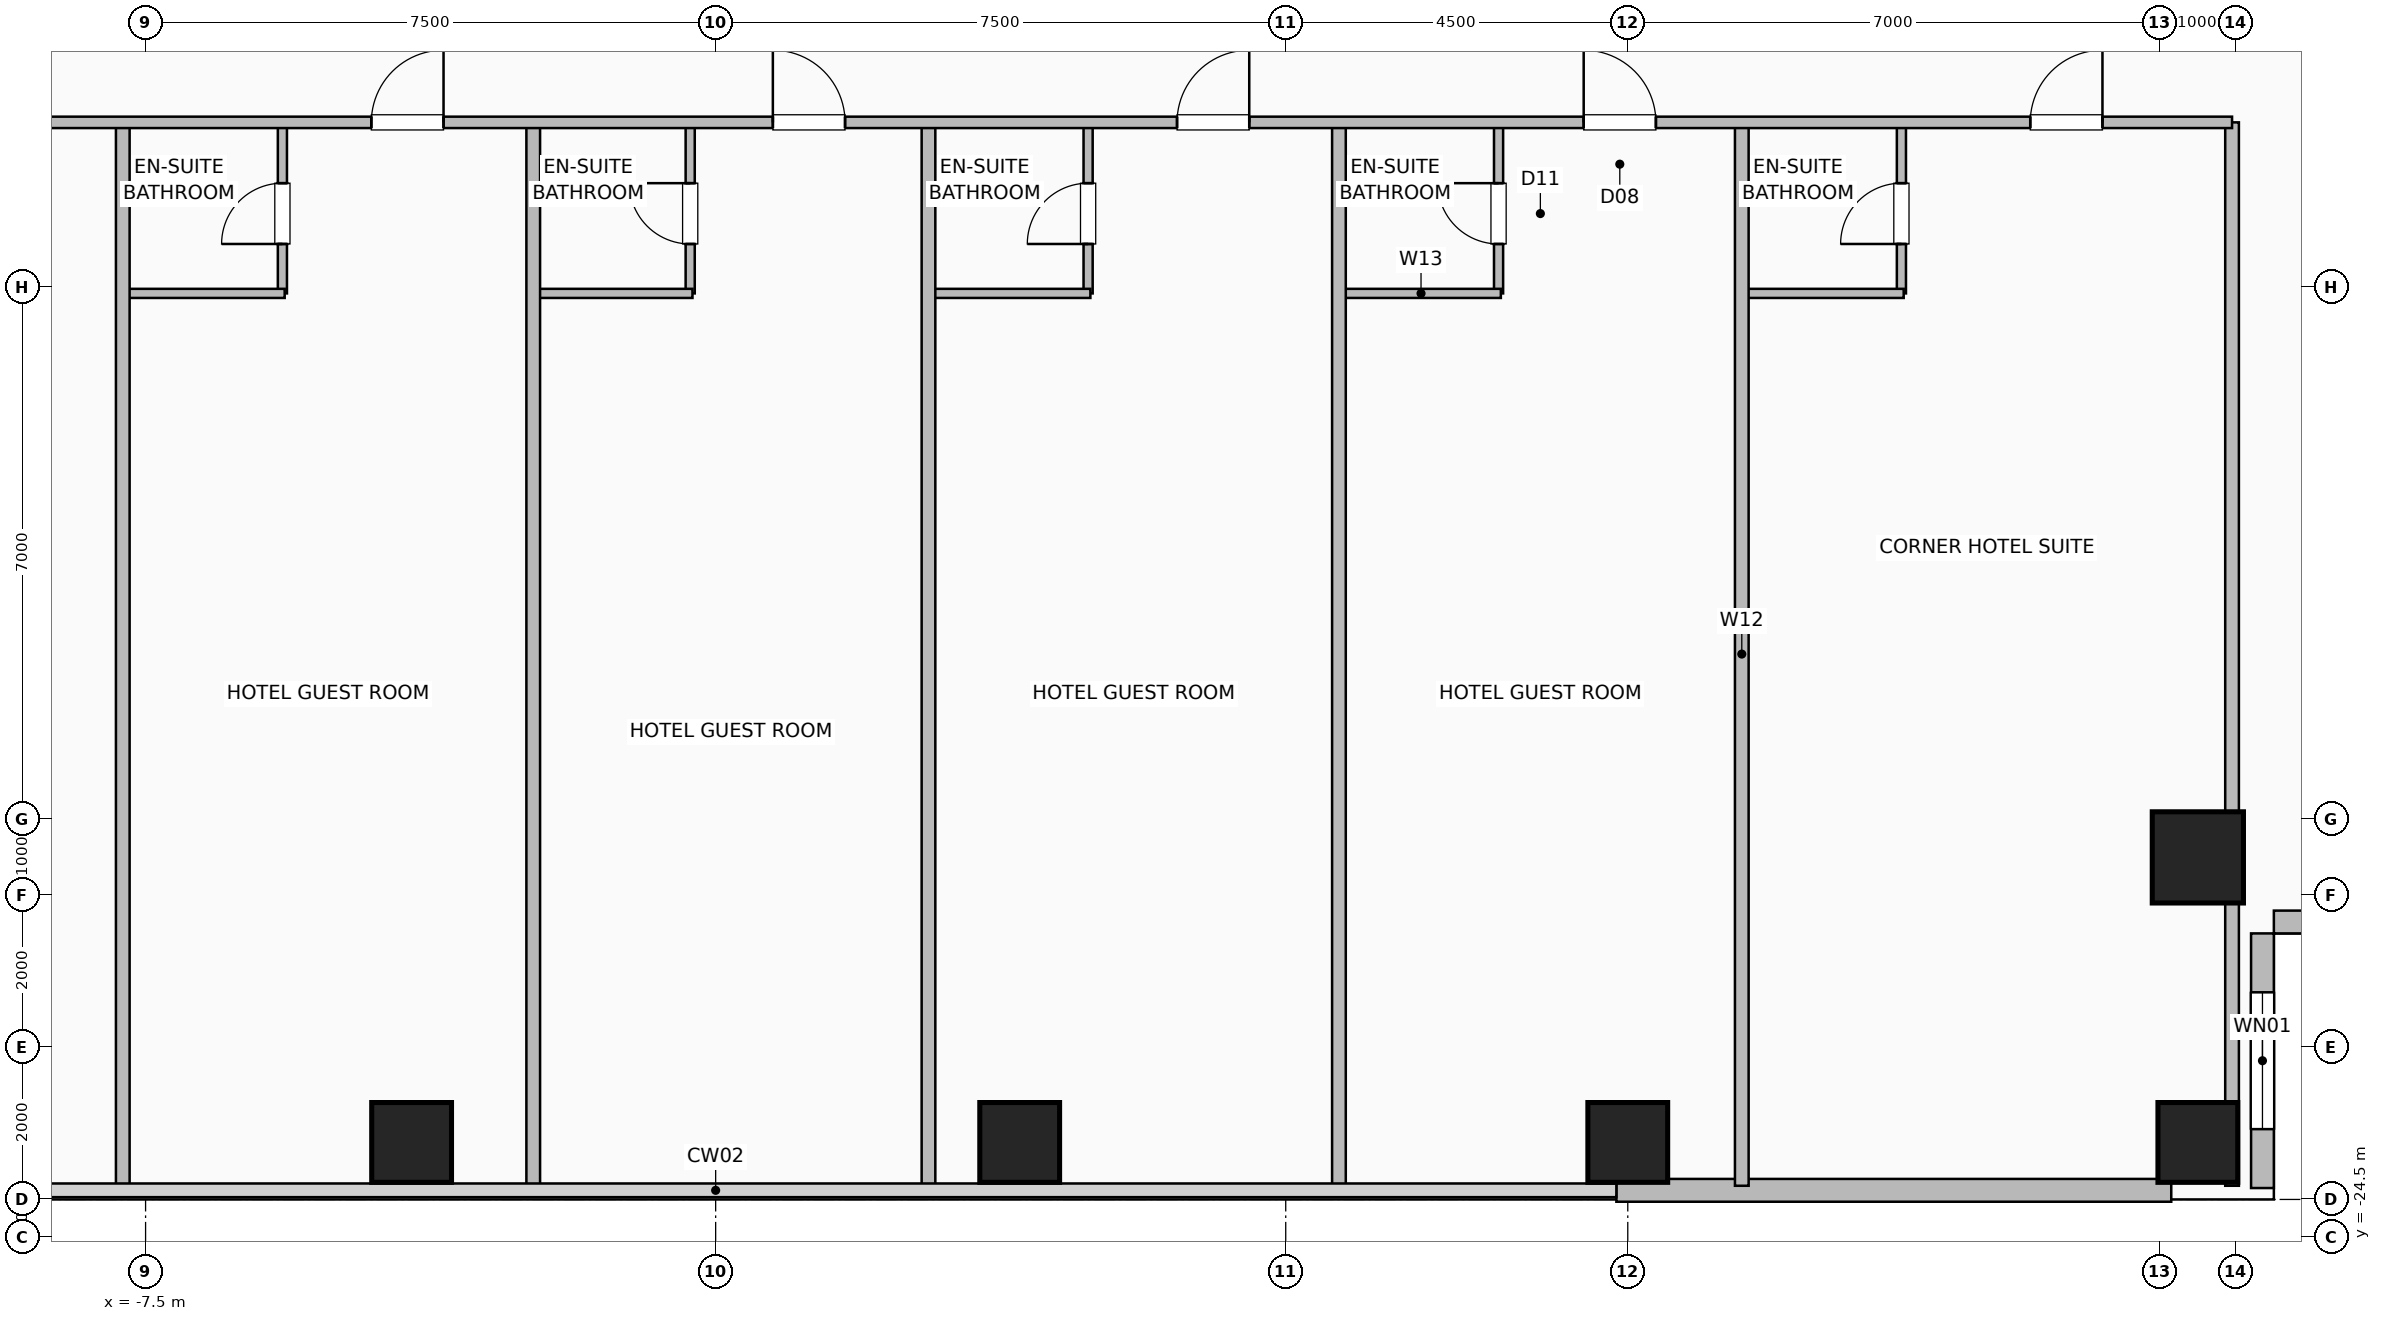
"""IFC4 building model, lengths in metres.
Left out: names, types, materials, properties, quantities, classifications, styles, units other than length and angle.
Written with IfcOpenShell. Run it as: python <this file> out.ifc"""

import sys

from ifc_helpers import new_model, si_unit, direction, frame, frame_2d, origin, origin_2d, place, context, subcontext, project, spatial, rectangle, hollow_rectangle, extrude, element, fill, save


model = new_model("IFC4")
c1 = context("Model", 3, precision=1e-05, world=origin(), true_north=direction((0.0, 1.0)))
c2 = subcontext(c1, "Body", "Model", "MODEL_VIEW")
j1 = project(units=[si_unit("LENGTHUNIT", "METRE"), si_unit("PLANEANGLEUNIT", "RADIAN")], contexts=[c1])
p1 = place(None, origin())
s1 = spatial("IfcSite", under=j1, at=p1, CompositionType="ELEMENT")
p2 = place(p1, origin())
s2 = spatial("IfcBuilding", under=s1, at=p2, CompositionType="ELEMENT")
p3 = place(p2, frame((0.0, 0.0, 34.0)))
s3 = spatial("IfcBuildingStorey", under=s2, at=p3, CompositionType="ELEMENT", Elevation=34.0)
for number, where, z_axis, x_axis in (
    (1, (-4.0, -23.25, 0.0), (0.0, 0.0, 1.0), (1.0, 0.0, 0.0)),
    (2, (4.0, -23.25, 0.0), (0.0, 0.0, 1.0), (1.0, 0.0, 0.0)),
    (3, (12.0, -23.25, 0.0), (0.0, 0.0, 1.0), (1.0, 0.0, 0.0)),
    (4, (19.5, -23.25, 0.0), (0.0, 0.0, 1.0), (1.0, 0.0, 0.0)),
):
    element("IfcColumn", number, at=place(p3, frame(where, z_axis=z_axis, x_axis=x_axis)), inside=s3, PredefinedType="COLUMN", context=c2, shape_type="SweptSolid", body=[
        extrude(hollow_rectangle(XDim=1.05, YDim=1.05, WallThickness=0.05, at=origin_2d()), origin(), (0.0, 0.0, 1.0), 3.5),
    ])
p4 = place(p3, frame((19.5, -19.5, 0.0), z_axis=(0.0, 0.0, 1.0), x_axis=(1.0, 0.0, 0.0)))
e5 = element("IfcColumn", 5, at=p4, inside=s3, PredefinedType="COLUMN", context=c2, shape_type="SweptSolid", body=[
    extrude(hollow_rectangle(XDim=1.2, YDim=1.2, WallThickness=0.055, at=origin_2d()), origin(), (0.0, 0.0, 1.0), 3.5),
])
p5 = place(p3, frame((11.85, -23.88, 0.0), z_axis=(0.0, 0.0, 1.0), x_axis=(1.0, 0.0, 0.0)))
e6 = element("IfcWall", 6, at=p5, inside=s3, PredefinedType="SOLIDWALL", context=c2, shape_type="SweptSolid", body=[
    extrude(rectangle(XDim=7.3, YDim=0.3, at=frame_2d((3.65, 0.0))), origin(), (0.0, 0.0, 1.0), 3.25),
])
p6 = place(p3, frame((20.35, -23.85, 0.0), z_axis=(0.0, 0.0, 1.0), x_axis=(0.0, 1.0, 0.0)))
e7 = element("IfcWall", 7, at=p6, inside=s3, PredefinedType="SOLIDWALL", context=c2, shape_type="SweptSolid", body=[
    extrude(rectangle(XDim=3.35, YDim=0.3, at=frame_2d((1.675, 0.0))), origin(), (0.0, 0.0, 1.0), 3.25),
])
p7 = place(p6, frame((0.775, 0.0, 0.9)))
e8 = element("IfcOpeningElement", 8, at=p7, cuts=e7, PredefinedType="OPENING", context=c2, shape_type="SweptSolid", body=[
    extrude(rectangle(XDim=1.8, YDim=1.8, at=frame_2d((0.9, 0.9))), frame((0.0, 0.16, 0.0), z_axis=(0.0, -1.0, 0.0), x_axis=(1.0, 0.0, 0.0)), (0.0, 0.0, 1.0), 0.32),
])
p8 = place(p3, frame((23.85, -20.35, 0.0), z_axis=(0.0, 0.0, 1.0), x_axis=(-1.0, 0.0, 0.0)))
e9 = element("IfcWall", 9, at=p8, inside=s3, PredefinedType="SOLIDWALL", context=c2, shape_type="SweptSolid", body=[
    extrude(rectangle(XDim=3.35, YDim=0.3, at=frame_2d((1.675, 0.0))), origin(), (0.0, 0.0, 1.0), 3.25),
])
p9 = place(p3, frame((-5.7, -12.08, 0.0), z_axis=(0.0, 0.0, 1.0), x_axis=(0.0, 1.0, 0.0)))
e10 = element("IfcWall", 10, at=p9, inside=s3, PredefinedType="PLUMBINGWALL", context=c2, shape_type="SweptSolid", body=[
    extrude(rectangle(XDim=2.25, YDim=0.12, at=frame_2d((1.125, 0.0))), origin(), (0.0, 0.0, 1.0), 3.25),
])
p10 = place(p9, frame((0.65, 0.0, 0.0)))
e11 = element("IfcOpeningElement", 11, at=p10, cuts=e10, PredefinedType="OPENING", context=c2, shape_type="SweptSolid", body=[
    extrude(rectangle(XDim=0.8, YDim=2.05, at=frame_2d((0.4, 1.025))), frame((0.0, 0.07, 0.0), z_axis=(0.0, -1.0, 0.0), x_axis=(1.0, 0.0, 0.0)), (0.0, 0.0, 1.0), 0.14),
])
p11 = place(p3, frame((-7.77, -12.08, 0.0), z_axis=(0.0, 0.0, 1.0), x_axis=(1.0, 0.0, 0.0)))
e12 = element("IfcWall", 12, at=p11, inside=s3, PredefinedType="PLUMBINGWALL", context=c2, shape_type="SweptSolid", body=[
    extrude(rectangle(XDim=2.1, YDim=0.12, at=frame_2d((1.05, 0.0))), origin(), (0.0, 0.0, 1.0), 3.25),
])
p12 = place(p3, frame((-0.335, -12.08, 0.0), z_axis=(0.0, 0.0, 1.0), x_axis=(0.0, 1.0, 0.0)))
e13 = element("IfcWall", 13, at=p12, inside=s3, PredefinedType="PLUMBINGWALL", context=c2, shape_type="SweptSolid", body=[
    extrude(rectangle(XDim=2.25, YDim=0.12, at=frame_2d((1.125, 0.0))), origin(), (0.0, 0.0, 1.0), 3.25),
])
p13 = place(p12, frame((0.65, 0.0, 0.0)))
e14 = element("IfcOpeningElement", 14, at=p13, cuts=e13, PredefinedType="OPENING", context=c2, shape_type="SweptSolid", body=[
    extrude(rectangle(XDim=0.8, YDim=2.05, at=frame_2d((0.4, 1.025))), frame((0.0, 0.07, 0.0), z_axis=(0.0, -1.0, 0.0), x_axis=(1.0, 0.0, 0.0)), (0.0, 0.0, 1.0), 0.14),
])
p14 = place(p3, frame((-2.37, -12.08, 0.0), z_axis=(0.0, 0.0, 1.0), x_axis=(1.0, 0.0, 0.0)))
e15 = element("IfcWall", 15, at=p14, inside=s3, PredefinedType="PLUMBINGWALL", context=c2, shape_type="SweptSolid", body=[
    extrude(rectangle(XDim=2.065, YDim=0.12, at=frame_2d((1.033, 0.0))), origin(), (0.0, 0.0, 1.0), 3.25),
])
p15 = place(p3, frame((4.9, -12.08, 0.0), z_axis=(0.0, 0.0, 1.0), x_axis=(0.0, 1.0, 0.0)))
e16 = element("IfcWall", 16, at=p15, inside=s3, PredefinedType="PLUMBINGWALL", context=c2, shape_type="SweptSolid", body=[
    extrude(rectangle(XDim=2.25, YDim=0.12, at=frame_2d((1.125, 0.0))), origin(), (0.0, 0.0, 1.0), 3.25),
])
p16 = place(p15, frame((0.65, 0.0, 0.0)))
e17 = element("IfcOpeningElement", 17, at=p16, cuts=e16, PredefinedType="OPENING", context=c2, shape_type="SweptSolid", body=[
    extrude(rectangle(XDim=0.8, YDim=2.05, at=frame_2d((0.4, 1.025))), frame((0.0, 0.07, 0.0), z_axis=(0.0, -1.0, 0.0), x_axis=(1.0, 0.0, 0.0)), (0.0, 0.0, 1.0), 0.14),
])
p17 = place(p3, frame((2.83, -12.08, 0.0), z_axis=(0.0, 0.0, 1.0), x_axis=(1.0, 0.0, 0.0)))
e18 = element("IfcWall", 18, at=p17, inside=s3, PredefinedType="PLUMBINGWALL", context=c2, shape_type="SweptSolid", body=[
    extrude(rectangle(XDim=2.1, YDim=0.12, at=frame_2d((1.05, 0.0))), origin(), (0.0, 0.0, 1.0), 3.25),
])
p18 = place(p3, frame((10.3, -12.08, 0.0), z_axis=(0.0, 0.0, 1.0), x_axis=(0.0, 1.0, 0.0)))
e19 = element("IfcWall", 19, at=p18, inside=s3, PredefinedType="PLUMBINGWALL", context=c2, shape_type="SweptSolid", body=[
    extrude(rectangle(XDim=2.25, YDim=0.12, at=frame_2d((1.125, 0.0))), origin(), (0.0, 0.0, 1.0), 3.25),
])
p19 = place(p18, frame((0.65, 0.0, 0.0)))
e20 = element("IfcOpeningElement", 20, at=p19, cuts=e19, PredefinedType="OPENING", context=c2, shape_type="SweptSolid", body=[
    extrude(rectangle(XDim=0.8, YDim=2.05, at=frame_2d((0.4, 1.025))), frame((0.0, 0.07, 0.0), z_axis=(0.0, -1.0, 0.0), x_axis=(1.0, 0.0, 0.0)), (0.0, 0.0, 1.0), 0.14),
])
p20 = place(p3, frame((8.23, -12.08, 0.0), z_axis=(0.0, 0.0, 1.0), x_axis=(1.0, 0.0, 0.0)))
e21 = element("IfcWall", 21, at=p20, inside=s3, PredefinedType="PLUMBINGWALL", context=c2, shape_type="SweptSolid", body=[
    extrude(rectangle(XDim=2.1, YDim=0.12, at=frame_2d((1.05, 0.0))), origin(), (0.0, 0.0, 1.0), 3.25),
])
p21 = place(p3, frame((15.6, -12.08, 0.0), z_axis=(0.0, 0.0, 1.0), x_axis=(0.0, 1.0, 0.0)))
e22 = element("IfcWall", 22, at=p21, inside=s3, PredefinedType="PLUMBINGWALL", context=c2, shape_type="SweptSolid", body=[
    extrude(rectangle(XDim=2.25, YDim=0.12, at=frame_2d((1.125, 0.0))), origin(), (0.0, 0.0, 1.0), 3.25),
])
p22 = place(p21, frame((0.65, 0.0, 0.0)))
e23 = element("IfcOpeningElement", 23, at=p22, cuts=e22, PredefinedType="OPENING", context=c2, shape_type="SweptSolid", body=[
    extrude(rectangle(XDim=0.8, YDim=2.05, at=frame_2d((0.4, 1.025))), frame((0.0, 0.07, 0.0), z_axis=(0.0, -1.0, 0.0), x_axis=(1.0, 0.0, 0.0)), (0.0, 0.0, 1.0), 0.14),
])
p23 = place(p3, frame((13.53, -12.08, 0.0), z_axis=(0.0, 0.0, 1.0), x_axis=(1.0, 0.0, 0.0)))
e24 = element("IfcWall", 24, at=p23, inside=s3, PredefinedType="PLUMBINGWALL", context=c2, shape_type="SweptSolid", body=[
    extrude(rectangle(XDim=2.1, YDim=0.12, at=frame_2d((1.05, 0.0))), origin(), (0.0, 0.0, 1.0), 3.25),
])
for number, where, z_axis, x_axis in (
    (25, (-7.8, -23.82, 0.0), (0.0, 0.0, 1.0), (0.0, 1.0, 0.0)),
    (26, (-2.4, -23.82, 0.0), (0.0, 0.0, 1.0), (0.0, 1.0, 0.0)),
    (27, (2.8, -23.82, 0.0), (0.0, 0.0, 1.0), (0.0, 1.0, 0.0)),
    (28, (8.2, -23.82, 0.0), (0.0, 0.0, 1.0), (0.0, 1.0, 0.0)),
    (29, (13.5, -23.82, 0.0), (0.0, 0.0, 1.0), (0.0, 1.0, 0.0)),
    (30, (19.95, -23.82, 0.0), (0.0, 0.0, 1.0), (0.0, 1.0, 0.0)),
):
    element("IfcWall", number, at=place(p3, frame(where, z_axis=z_axis, x_axis=x_axis)), inside=s3, PredefinedType="PARTITIONING", context=c2, shape_type="SweptSolid", body=[
        extrude(rectangle(XDim=13.99, YDim=0.18, at=frame_2d((6.995, 0.0))), origin(), (0.0, 0.0, 1.0), 3.25),
    ])
p24 = place(p3, frame((-19.95, -9.83, 0.0), z_axis=(0.0, 0.0, 1.0), x_axis=(1.0, 0.0, 0.0)))
e31 = element("IfcWall", 31, at=p24, inside=s3, PredefinedType="PARTITIONING", context=c2, shape_type="SweptSolid", body=[
    extrude(rectangle(XDim=39.9, YDim=0.15, at=frame_2d((19.95, 0.0))), origin(), (0.0, 0.0, 1.0), 3.25),
])
p25 = place(p24, frame((3.945, 0.0, 0.0)))
e32 = element("IfcOpeningElement", 32, at=p25, cuts=e31, PredefinedType="OPENING", context=c2, shape_type="SweptSolid", body=[
    extrude(rectangle(XDim=0.95, YDim=2.08, at=frame_2d((0.475, 1.04))), frame((0.0, 0.085, 0.0), z_axis=(0.0, -1.0, 0.0), x_axis=(1.0, 0.0, 0.0)), (0.0, 0.0, 1.0), 0.17),
])
p26 = place(p24, frame((10.02, 0.0, 0.0)))
e33 = element("IfcOpeningElement", 33, at=p26, cuts=e31, PredefinedType="OPENING", context=c2, shape_type="SweptSolid", body=[
    extrude(rectangle(XDim=0.95, YDim=2.08, at=frame_2d((0.475, 1.04))), frame((0.0, 0.085, 0.0), z_axis=(0.0, -1.0, 0.0), x_axis=(1.0, 0.0, 0.0)), (0.0, 0.0, 1.0), 0.17),
])
p27 = place(p24, frame((15.42, 0.0, 0.0)))
e34 = element("IfcOpeningElement", 34, at=p27, cuts=e31, PredefinedType="OPENING", context=c2, shape_type="SweptSolid", body=[
    extrude(rectangle(XDim=0.95, YDim=2.08, at=frame_2d((0.475, 1.04))), frame((0.0, 0.085, 0.0), z_axis=(0.0, -1.0, 0.0), x_axis=(1.0, 0.0, 0.0)), (0.0, 0.0, 1.0), 0.17),
])
p28 = place(p24, frame((20.702, 0.0, 0.0)))
e35 = element("IfcOpeningElement", 35, at=p28, cuts=e31, PredefinedType="OPENING", context=c2, shape_type="SweptSolid", body=[
    extrude(rectangle(XDim=0.95, YDim=2.08, at=frame_2d((0.475, 1.04))), frame((0.0, 0.085, 0.0), z_axis=(0.0, -1.0, 0.0), x_axis=(1.0, 0.0, 0.0)), (0.0, 0.0, 1.0), 0.17),
])
p29 = place(p24, frame((26.02, 0.0, 0.0)))
e36 = element("IfcOpeningElement", 36, at=p29, cuts=e31, PredefinedType="OPENING", context=c2, shape_type="SweptSolid", body=[
    extrude(rectangle(XDim=0.95, YDim=2.08, at=frame_2d((0.475, 1.04))), frame((0.0, 0.085, 0.0), z_axis=(0.0, -1.0, 0.0), x_axis=(1.0, 0.0, 0.0)), (0.0, 0.0, 1.0), 0.17),
])
p30 = place(p24, frame((31.37, 0.0, 0.0)))
e37 = element("IfcOpeningElement", 37, at=p30, cuts=e31, PredefinedType="OPENING", context=c2, shape_type="SweptSolid", body=[
    extrude(rectangle(XDim=0.95, YDim=2.08, at=frame_2d((0.475, 1.04))), frame((0.0, 0.085, 0.0), z_axis=(0.0, -1.0, 0.0), x_axis=(1.0, 0.0, 0.0)), (0.0, 0.0, 1.0), 0.17),
])
p31 = place(p24, frame((37.245, 0.0, 0.0)))
e38 = element("IfcOpeningElement", 38, at=p31, cuts=e31, PredefinedType="OPENING", context=c2, shape_type="SweptSolid", body=[
    extrude(rectangle(XDim=0.95, YDim=2.08, at=frame_2d((0.475, 1.04))), frame((0.0, 0.085, 0.0), z_axis=(0.0, -1.0, 0.0), x_axis=(1.0, 0.0, 0.0)), (0.0, 0.0, 1.0), 0.17),
])
p32 = place(p7, origin())
e39 = element("IfcWindow", 39, at=p32, inside=s3, PartitioningType="SINGLE_PANEL", PredefinedType="WINDOW", context=c2, shape_type="SweptSolid", body=[
    extrude(rectangle(XDim=1.8, YDim=1.8, at=frame_2d((0.9, 0.9))), frame((0.0, 0.03, 0.0), z_axis=(0.0, -1.0, 0.0), x_axis=(1.0, 0.0, 0.0)), (0.0, 0.0, 1.0), 0.06),
])
fill(e8, e39)
p33 = place(p10, origin())
e40 = element("IfcDoor", 40, at=p33, inside=s3, OperationType="SINGLE_SWING_LEFT", PredefinedType="DOOR", context=c2, shape_type="SweptSolid", body=[
    extrude(rectangle(XDim=0.8, YDim=2.05, at=frame_2d((0.4, 1.025))), frame((0.0, 0.025, 0.0), z_axis=(0.0, -1.0, 0.0), x_axis=(1.0, 0.0, 0.0)), (0.0, 0.0, 1.0), 0.05),
])
fill(e11, e40)
p34 = place(p13, origin())
e41 = element("IfcDoor", 41, at=p34, inside=s3, OperationType="SINGLE_SWING_RIGHT", PredefinedType="DOOR", context=c2, shape_type="SweptSolid", body=[
    extrude(rectangle(XDim=0.8, YDim=2.05, at=frame_2d((0.4, 1.025))), frame((0.0, 0.025, 0.0), z_axis=(0.0, -1.0, 0.0), x_axis=(1.0, 0.0, 0.0)), (0.0, 0.0, 1.0), 0.05),
])
fill(e14, e41)
p35 = place(p16, origin())
e42 = element("IfcDoor", 42, at=p35, inside=s3, OperationType="SINGLE_SWING_LEFT", PredefinedType="DOOR", context=c2, shape_type="SweptSolid", body=[
    extrude(rectangle(XDim=0.8, YDim=2.05, at=frame_2d((0.4, 1.025))), frame((0.0, 0.025, 0.0), z_axis=(0.0, -1.0, 0.0), x_axis=(1.0, 0.0, 0.0)), (0.0, 0.0, 1.0), 0.05),
])
fill(e17, e42)
p36 = place(p19, origin())
e43 = element("IfcDoor", 43, at=p36, inside=s3, OperationType="SINGLE_SWING_RIGHT", PredefinedType="DOOR", context=c2, shape_type="SweptSolid", body=[
    extrude(rectangle(XDim=0.8, YDim=2.05, at=frame_2d((0.4, 1.025))), frame((0.0, 0.025, 0.0), z_axis=(0.0, -1.0, 0.0), x_axis=(1.0, 0.0, 0.0)), (0.0, 0.0, 1.0), 0.05),
])
fill(e20, e43)
p37 = place(p22, origin())
e44 = element("IfcDoor", 44, at=p37, inside=s3, OperationType="SINGLE_SWING_LEFT", PredefinedType="DOOR", context=c2, shape_type="SweptSolid", body=[
    extrude(rectangle(XDim=0.8, YDim=2.05, at=frame_2d((0.4, 1.025))), frame((0.0, 0.025, 0.0), z_axis=(0.0, -1.0, 0.0), x_axis=(1.0, 0.0, 0.0)), (0.0, 0.0, 1.0), 0.05),
])
fill(e23, e44)
p38 = place(p27, origin())
e45 = element("IfcDoor", 45, at=p38, inside=s3, OperationType="SINGLE_SWING_RIGHT", PredefinedType="DOOR", context=c2, shape_type="SweptSolid", body=[
    extrude(rectangle(XDim=0.95, YDim=2.08, at=frame_2d((0.475, 1.04))), frame((0.0, 0.025, 0.0), z_axis=(0.0, -1.0, 0.0), x_axis=(1.0, 0.0, 0.0)), (0.0, 0.0, 1.0), 0.05),
])
fill(e34, e45)
p39 = place(p28, origin())
e46 = element("IfcDoor", 46, at=p39, inside=s3, OperationType="SINGLE_SWING_LEFT", PredefinedType="DOOR", context=c2, shape_type="SweptSolid", body=[
    extrude(rectangle(XDim=0.95, YDim=2.08, at=frame_2d((0.475, 1.04))), frame((0.0, 0.025, 0.0), z_axis=(0.0, -1.0, 0.0), x_axis=(1.0, 0.0, 0.0)), (0.0, 0.0, 1.0), 0.05),
])
fill(e35, e46)
p40 = place(p29, origin())
e47 = element("IfcDoor", 47, at=p40, inside=s3, OperationType="SINGLE_SWING_RIGHT", PredefinedType="DOOR", context=c2, shape_type="SweptSolid", body=[
    extrude(rectangle(XDim=0.95, YDim=2.08, at=frame_2d((0.475, 1.04))), frame((0.0, 0.025, 0.0), z_axis=(0.0, -1.0, 0.0), x_axis=(1.0, 0.0, 0.0)), (0.0, 0.0, 1.0), 0.05),
])
fill(e36, e47)
p41 = place(p30, origin())
e48 = element("IfcDoor", 48, at=p41, inside=s3, OperationType="SINGLE_SWING_LEFT", PredefinedType="DOOR", context=c2, shape_type="SweptSolid", body=[
    extrude(rectangle(XDim=0.95, YDim=2.08, at=frame_2d((0.475, 1.04))), frame((0.0, 0.025, 0.0), z_axis=(0.0, -1.0, 0.0), x_axis=(1.0, 0.0, 0.0)), (0.0, 0.0, 1.0), 0.05),
])
fill(e37, e48)
p42 = place(p31, origin())
e49 = element("IfcDoor", 49, at=p42, inside=s3, OperationType="SINGLE_SWING_RIGHT", PredefinedType="DOOR", context=c2, shape_type="SweptSolid", body=[
    extrude(rectangle(XDim=0.95, YDim=2.08, at=frame_2d((0.475, 1.04))), frame((0.0, 0.025, 0.0), z_axis=(0.0, -1.0, 0.0), x_axis=(1.0, 0.0, 0.0)), (0.0, 0.0, 1.0), 0.05),
])
fill(e38, e49)
save(model, sys.argv[1])
